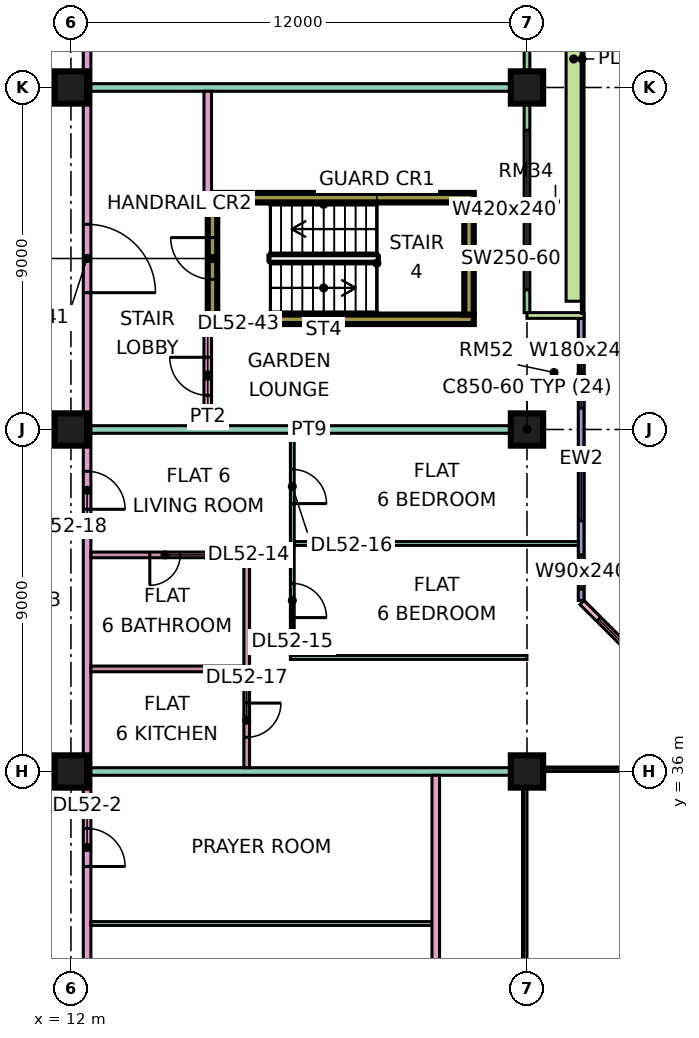
"""IFC4 building model, lengths in metres.
Left out: names, types, materials, properties, quantities, classifications, styles, units other than length and angle.
Written with IfcOpenShell. Run it as: python <this file> out.ifc"""

import sys

from ifc_helpers import new_model, si_unit, direction, frame, frame_2d, origin, origin_2d, place, context, subcontext, project, spatial, rectangle, extrude, element, fill, save


model = new_model("IFC4")
c1 = context("Model", 3, precision=1e-05, world=origin(), true_north=direction((0.0, 1.0)))
c2 = subcontext(c1, "Body", "Model", "MODEL_VIEW")
j1 = project(units=[si_unit("LENGTHUNIT", "METRE"), si_unit("PLANEANGLEUNIT", "RADIAN")], contexts=[c1])
p1 = place(None, origin())
s1 = spatial("IfcSite", under=j1, at=p1, CompositionType="ELEMENT")
p2 = place(p1, origin())
s2 = spatial("IfcBuilding", under=s1, at=p2, CompositionType="ELEMENT")
p3 = place(p2, frame((0.0, 0.0, 222.9)))
s3 = spatial("IfcBuildingStorey", under=s2, at=p3, CompositionType="ELEMENT", Elevation=222.9)
for number, where, z_axis, x_axis in (
    (1, (12.0, 36.0, 0.0), (0.0, 0.0, 1.0), (1.0, 0.0, 0.0)),
    (2, (12.0, 45.0, 0.0), (0.0, 0.0, 1.0), (1.0, 0.0, 0.0)),
    (3, (12.0, 54.0, 0.0), (0.0, 0.0, 1.0), (1.0, 0.0, 0.0)),
    (4, (24.0, 36.0, 0.0), (0.0, 0.0, 1.0), (1.0, 0.0, 0.0)),
    (5, (24.0, 45.0, 0.0), (0.0, 0.0, 1.0), (1.0, 0.0, 0.0)),
    (6, (24.0, 54.0, 0.0), (0.0, 0.0, 1.0), (1.0, 0.0, 0.0)),
):
    element("IfcColumn", number, at=place(p3, frame(where, z_axis=z_axis, x_axis=x_axis)), inside=s3, PredefinedType="COLUMN", context=c2, shape_type="SweptSolid", body=[
        extrude(rectangle(XDim=0.85, YDim=0.85, at=origin_2d()), origin(), (0.0, 0.0, 1.0), 3.75),
    ])
for number, where, z_axis, x_axis in (
    (7, (15.6, 47.9, 0.0), (0.0, 0.0, 1.0), (1.0, 0.0, 0.0)),
    (8, (15.6, 51.1, 0.0), (0.0, 0.0, 1.0), (1.0, 0.0, 0.0)),
):
    element("IfcWall", number, at=place(p3, frame(where, z_axis=z_axis, x_axis=x_axis)), inside=s3, PredefinedType="SHEAR", context=c2, shape_type="SweptSolid", body=[
        extrude(rectangle(XDim=7.0, YDim=0.25, at=frame_2d((3.5, 0.0))), origin(), (0.0, 0.0, 1.0), 3.75),
    ])
p4 = place(p3, frame((15.725, 48.025, 0.0), z_axis=(0.0, 0.0, 1.0), x_axis=(0.0, 1.0, 0.0)))
e9 = element("IfcWall", 9, at=p4, inside=s3, PredefinedType="SHEAR", context=c2, shape_type="SweptSolid", body=[
    extrude(rectangle(XDim=2.95, YDim=0.25, at=frame_2d((1.475, 0.0))), origin(), (0.0, 0.0, 1.0), 3.75),
])
p5 = place(p4, frame((0.925, 0.0, 0.0)))
e10 = element("IfcOpeningElement", 10, at=p5, cuts=e9, PredefinedType="OPENING", context=c2, shape_type="SweptSolid", body=[
    extrude(rectangle(XDim=1.1, YDim=2.2, at=frame_2d((0.55, 1.1))), frame((0.0, 0.135, 0.0), z_axis=(0.0, -1.0, 0.0), x_axis=(1.0, 0.0, 0.0)), (0.0, 0.0, 1.0), 0.27),
])
p6 = place(p3, frame((22.475, 48.025, 0.0), z_axis=(0.0, 0.0, 1.0), x_axis=(0.0, 1.0, 0.0)))
e11 = element("IfcWall", 11, at=p6, inside=s3, PredefinedType="SHEAR", context=c2, shape_type="SweptSolid", body=[
    extrude(rectangle(XDim=2.95, YDim=0.25, at=frame_2d((1.475, 0.0))), origin(), (0.0, 0.0, 1.0), 3.75),
])
p7 = place(p3, frame((28.447, 37.447, 0.0), z_axis=(0.0, 0.0, 1.0), x_axis=(-0.707106781187, 0.707106781187, 0.0)))
e12 = element("IfcWall", 12, at=p7, inside=s3, PredefinedType="SOLIDWALL", context=c2, shape_type="SweptSolid", body=[
    extrude(rectangle(XDim=4.243, YDim=0.15, at=frame_2d((2.121, 0.0))), origin(), (0.0, 0.0, 1.0), 3.35),
])
p8 = place(p7, frame((0.621, 0.0, 0.45)))
e13 = element("IfcOpeningElement", 13, at=p8, cuts=e12, PredefinedType="OPENING", context=c2, shape_type="SweptSolid", body=[
    extrude(rectangle(XDim=3.0, YDim=2.4, at=frame_2d((1.5, 1.2))), frame((0.0, 0.085, 0.0), z_axis=(0.0, -1.0, 0.0), x_axis=(1.0, 0.0, 0.0)), (0.0, 0.0, 1.0), 0.17),
])
p9 = place(p3, frame((25.425, 40.5, 0.0), z_axis=(0.0, 0.0, 1.0), x_axis=(0.0, 1.0, 0.0)))
e14 = element("IfcWall", 14, at=p9, inside=s3, PredefinedType="SOLIDWALL", context=c2, shape_type="SweptSolid", body=[
    extrude(rectangle(XDim=7.425, YDim=0.15, at=frame_2d((3.712, 0.0))), origin(), (0.0, 0.0, 1.0), 3.35),
])
p10 = place(p9, frame((0.3, 0.0, 0.45)))
e15 = element("IfcOpeningElement", 15, at=p10, cuts=e14, PredefinedType="OPENING", context=c2, shape_type="SweptSolid", body=[
    extrude(rectangle(XDim=0.9, YDim=2.4, at=frame_2d((0.45, 1.2))), frame((0.0, 0.085, 0.0), z_axis=(0.0, -1.0, 0.0), x_axis=(1.0, 0.0, 0.0)), (0.0, 0.0, 1.0), 0.17),
])
p11 = place(p9, frame((2.1, 0.0, 0.45)))
e16 = element("IfcOpeningElement", 16, at=p11, cuts=e14, PredefinedType="OPENING", context=c2, shape_type="SweptSolid", body=[
    extrude(rectangle(XDim=1.8, YDim=2.4, at=frame_2d((0.9, 1.2))), frame((0.0, 0.085, 0.0), z_axis=(0.0, -1.0, 0.0), x_axis=(1.0, 0.0, 0.0)), (0.0, 0.0, 1.0), 0.17),
])
p12 = place(p9, frame((5.062, 0.0, 0.45)))
e17 = element("IfcOpeningElement", 17, at=p12, cuts=e14, PredefinedType="OPENING", context=c2, shape_type="SweptSolid", body=[
    extrude(rectangle(XDim=1.8, YDim=2.4, at=frame_2d((0.9, 1.2))), frame((0.0, 0.085, 0.0), z_axis=(0.0, -1.0, 0.0), x_axis=(1.0, 0.0, 0.0)), (0.0, 0.0, 1.0), 0.17),
])
p13 = place(p3, frame((24.0, 48.075, 0.0), z_axis=(0.0, 0.0, 1.0), x_axis=(0.0, 1.0, 0.0)))
e18 = element("IfcWall", 18, at=p13, inside=s3, PredefinedType="SOLIDWALL", context=c2, shape_type="SweptSolid", body=[
    extrude(rectangle(XDim=13.35, YDim=0.15, at=frame_2d((6.675, 0.0))), origin(), (0.0, 0.0, 1.0), 3.35),
])
p14 = place(p13, frame((0.6, 0.0, 0.45)))
e19 = element("IfcOpeningElement", 19, at=p14, cuts=e18, PredefinedType="OPENING", context=c2, shape_type="SweptSolid", body=[
    extrude(rectangle(XDim=4.2, YDim=2.4, at=frame_2d((2.1, 1.2))), frame((0.0, 0.085, 0.0), z_axis=(0.0, -1.0, 0.0), x_axis=(1.0, 0.0, 0.0)), (0.0, 0.0, 1.0), 0.17),
])
p15 = place(p13, frame((8.288, 0.0, 0.0)))
e20 = element("IfcOpeningElement", 20, at=p15, cuts=e18, PredefinedType="OPENING", context=c2, shape_type="SweptSolid", body=[
    extrude(rectangle(XDim=1.8, YDim=2.4, at=frame_2d((0.9, 1.2))), frame((0.0, 0.085, 0.0), z_axis=(0.0, -1.0, 0.0), x_axis=(1.0, 0.0, 0.0)), (0.0, 0.0, 1.0), 0.17),
])
p16 = place(p13, frame((12.188, 0.0, 0.45)))
e21 = element("IfcOpeningElement", 21, at=p16, cuts=e18, PredefinedType="OPENING", context=c2, shape_type="SweptSolid", body=[
    extrude(rectangle(XDim=0.9, YDim=2.4, at=frame_2d((0.45, 1.2))), frame((0.0, 0.085, 0.0), z_axis=(0.0, -1.0, 0.0), x_axis=(1.0, 0.0, 0.0)), (0.0, 0.0, 1.0), 0.17),
])
p17 = place(p3, frame((25.5, 48.0, 0.0), z_axis=(0.0, 0.0, 1.0), x_axis=(-1.0, 0.0, 0.0)))
e22 = element("IfcWall", 22, at=p17, inside=s3, PredefinedType="SOLIDWALL", context=c2, shape_type="SweptSolid", body=[
    extrude(rectangle(XDim=1.5, YDim=0.15, at=frame_2d((0.75, 0.0))), origin(), (0.0, 0.0, 1.0), 3.35),
])
p18 = place(p3, frame((25.229, 48.375, 0.0), z_axis=(0.0, 0.0, 1.0), x_axis=(0.0, 1.0, 0.0)))
e23 = element("IfcWall", 23, at=p18, inside=s3, PredefinedType="SOLIDWALL", context=c2, shape_type="SweptSolid", body=[
    extrude(rectangle(XDim=12.75, YDim=0.4, at=frame_2d((6.375, 0.0))), origin(), (0.0, 0.0, 1.0), 0.7),
])
p19 = place(p3, frame((12.425, 20.0, 0.0), z_axis=(0.0, 0.0, 1.0), x_axis=(0.0, 1.0, 0.0)))
e24 = element("IfcWall", 24, at=p19, inside=s3, PredefinedType="PARTITIONING", context=c2, shape_type="SweptSolid", body=[
    extrude(rectangle(XDim=43.0, YDim=0.2, at=frame_2d((21.5, 0.0))), origin(), (0.0, 0.0, 1.0), 3.35),
])
p20 = place(p19, frame((7.15, 0.0, 0.0)))
e25 = element("IfcOpeningElement", 25, at=p20, cuts=e24, PredefinedType="OPENING", context=c2, shape_type="SweptSolid", body=[
    extrude(rectangle(XDim=1.6, YDim=2.1, at=frame_2d((0.8, 1.05))), frame((0.0, 0.11, 0.0), z_axis=(0.0, -1.0, 0.0), x_axis=(1.0, 0.0, 0.0)), (0.0, 0.0, 1.0), 0.22),
])
p21 = place(p19, frame((13.5, 0.0, 0.0)))
e26 = element("IfcOpeningElement", 26, at=p21, cuts=e24, PredefinedType="OPENING", context=c2, shape_type="SweptSolid", body=[
    extrude(rectangle(XDim=1.0, YDim=2.1, at=frame_2d((0.5, 1.05))), frame((0.0, 0.11, 0.0), z_axis=(0.0, -1.0, 0.0), x_axis=(1.0, 0.0, 0.0)), (0.0, 0.0, 1.0), 0.22),
])
p22 = place(p19, frame((22.9, 0.0, 0.0)))
e27 = element("IfcOpeningElement", 27, at=p22, cuts=e24, PredefinedType="OPENING", context=c2, shape_type="SweptSolid", body=[
    extrude(rectangle(XDim=1.0, YDim=2.1, at=frame_2d((0.5, 1.05))), frame((0.0, 0.11, 0.0), z_axis=(0.0, -1.0, 0.0), x_axis=(1.0, 0.0, 0.0)), (0.0, 0.0, 1.0), 0.22),
])
p23 = place(p19, frame((35.35, 0.0, 0.0)))
e28 = element("IfcOpeningElement", 28, at=p23, cuts=e24, PredefinedType="OPENING", context=c2, shape_type="SweptSolid", body=[
    extrude(rectangle(XDim=1.0, YDim=2.1, at=frame_2d((0.5, 1.05))), frame((0.0, 0.11, 0.0), z_axis=(0.0, -1.0, 0.0), x_axis=(1.0, 0.0, 0.0)), (0.0, 0.0, 1.0), 0.22),
])
p24 = place(p19, frame((1.15, 0.0, 0.0)))
e29 = element("IfcOpeningElement", 29, at=p24, cuts=e24, PredefinedType="OPENING", context=c2, shape_type="SweptSolid", body=[
    extrude(rectangle(XDim=1.8, YDim=2.1, at=frame_2d((0.9, 1.05))), frame((0.0, 0.11, 0.0), z_axis=(0.0, -1.0, 0.0), x_axis=(1.0, 0.0, 0.0)), (0.0, 0.0, 1.0), 0.22),
])
p25 = place(p19, frame((28.6, 0.0, 0.0)))
e30 = element("IfcOpeningElement", 30, at=p25, cuts=e24, PredefinedType="OPENING", context=c2, shape_type="SweptSolid", body=[
    extrude(rectangle(XDim=1.8, YDim=2.1, at=frame_2d((0.9, 1.05))), frame((0.0, 0.11, 0.0), z_axis=(0.0, -1.0, 0.0), x_axis=(1.0, 0.0, 0.0)), (0.0, 0.0, 1.0), 0.22),
])
p26 = place(p3, frame((12.525, 32.0, 0.0), z_axis=(0.0, 0.0, 1.0), x_axis=(1.0, 0.0, 0.0)))
e31 = element("IfcWall", 31, at=p26, inside=s3, PredefinedType="PARTITIONING", context=c2, shape_type="SweptSolid", body=[
    extrude(rectangle(XDim=8.975, YDim=0.1, at=frame_2d((4.488, 0.0))), origin(), (0.0, 0.0, 1.0), 3.35),
])
p27 = place(p3, frame((12.525, 36.0, 0.0), z_axis=(0.0, 0.0, 1.0), x_axis=(1.0, 0.0, 0.0)))
e32 = element("IfcWall", 32, at=p27, inside=s3, PredefinedType="PARTITIONING", context=c2, shape_type="SweptSolid", body=[
    extrude(rectangle(XDim=11.475, YDim=0.2, at=frame_2d((5.738, 0.0))), origin(), (0.0, 0.0, 1.0), 3.35),
])
p28 = place(p3, frame((12.525, 38.7, 0.0), z_axis=(0.0, 0.0, 1.0), x_axis=(1.0, 0.0, 0.0)))
e33 = element("IfcWall", 33, at=p28, inside=s3, PredefinedType="PARTITIONING", context=c2, shape_type="SweptSolid", body=[
    extrude(rectangle(XDim=4.025, YDim=0.15, at=frame_2d((2.013, 0.0))), origin(), (0.0, 0.0, 1.0), 3.35),
])
p29 = place(p3, frame((12.525, 41.7, 0.0), z_axis=(0.0, 0.0, 1.0), x_axis=(1.0, 0.0, 0.0)))
e34 = element("IfcWall", 34, at=p29, inside=s3, PredefinedType="PARTITIONING", context=c2, shape_type="SweptSolid", body=[
    extrude(rectangle(XDim=4.025, YDim=0.15, at=frame_2d((2.013, 0.0))), origin(), (0.0, 0.0, 1.0), 3.35),
])
p30 = place(p29, frame((1.55, 0.0, 0.0)))
e35 = element("IfcOpeningElement", 35, at=p30, cuts=e34, PredefinedType="OPENING", context=c2, shape_type="SweptSolid", body=[
    extrude(rectangle(XDim=0.8, YDim=2.1, at=frame_2d((0.4, 1.05))), frame((0.0, 0.085, 0.0), z_axis=(0.0, -1.0, 0.0), x_axis=(1.0, 0.0, 0.0)), (0.0, 0.0, 1.0), 0.17),
])
p31 = place(p3, frame((12.525, 45.0, 0.0), z_axis=(0.0, 0.0, 1.0), x_axis=(1.0, 0.0, 0.0)))
e36 = element("IfcWall", 36, at=p31, inside=s3, PredefinedType="PARTITIONING", context=c2, shape_type="SweptSolid", body=[
    extrude(rectangle(XDim=11.475, YDim=0.2, at=frame_2d((5.738, 0.0))), origin(), (0.0, 0.0, 1.0), 3.35),
])
p32 = place(p3, frame((12.525, 54.0, 0.0), z_axis=(0.0, 0.0, 1.0), x_axis=(1.0, 0.0, 0.0)))
e37 = element("IfcWall", 37, at=p32, inside=s3, PredefinedType="PARTITIONING", context=c2, shape_type="SweptSolid", body=[
    extrude(rectangle(XDim=11.401, YDim=0.2, at=frame_2d((5.701, 0.0))), origin(), (0.0, 0.0, 1.0), 3.35),
])
p33 = place(p3, frame((15.6, 45.1, 0.0), z_axis=(0.0, 0.0, 1.0), x_axis=(0.0, 1.0, 0.0)))
e38 = element("IfcWall", 38, at=p33, inside=s3, PredefinedType="PARTITIONING", context=c2, shape_type="SweptSolid", body=[
    extrude(rectangle(XDim=2.675, YDim=0.2, at=frame_2d((1.337, 0.0))), origin(), (0.0, 0.0, 1.0), 3.35),
])
p34 = place(p33, frame((0.8, 0.0, 0.0)))
e39 = element("IfcOpeningElement", 39, at=p34, cuts=e38, PredefinedType="OPENING", context=c2, shape_type="SweptSolid", body=[
    extrude(rectangle(XDim=1.0, YDim=2.1, at=frame_2d((0.5, 1.05))), frame((0.0, 0.11, 0.0), z_axis=(0.0, -1.0, 0.0), x_axis=(1.0, 0.0, 0.0)), (0.0, 0.0, 1.0), 0.22),
])
p35 = place(p3, frame((15.6, 51.225, 0.0), z_axis=(0.0, 0.0, 1.0), x_axis=(0.0, 1.0, 0.0)))
e40 = element("IfcWall", 40, at=p35, inside=s3, PredefinedType="PARTITIONING", context=c2, shape_type="SweptSolid", body=[
    extrude(rectangle(XDim=2.675, YDim=0.2, at=frame_2d((1.337, 0.0))), origin(), (0.0, 0.0, 1.0), 3.35),
])
p36 = place(p3, frame((16.625, 36.1, 0.0), z_axis=(0.0, 0.0, 1.0), x_axis=(0.0, 1.0, 0.0)))
e41 = element("IfcWall", 41, at=p36, inside=s3, PredefinedType="PARTITIONING", context=c2, shape_type="SweptSolid", body=[
    extrude(rectangle(XDim=5.675, YDim=0.15, at=frame_2d((2.837, 0.0))), origin(), (0.0, 0.0, 1.0), 3.35),
])
p37 = place(p36, frame((0.8, 0.0, 0.0)))
e42 = element("IfcOpeningElement", 42, at=p37, cuts=e41, PredefinedType="OPENING", context=c2, shape_type="SweptSolid", body=[
    extrude(rectangle(XDim=0.9, YDim=2.1, at=frame_2d((0.45, 1.05))), frame((0.0, 0.085, 0.0), z_axis=(0.0, -1.0, 0.0), x_axis=(1.0, 0.0, 0.0)), (0.0, 0.0, 1.0), 0.17),
])
p38 = place(p3, frame((17.775, 39.0, 0.0), z_axis=(0.0, 0.0, 1.0), x_axis=(1.0, 0.0, 0.0)))
e43 = element("IfcWall", 43, at=p38, inside=s3, PredefinedType="PARTITIONING", context=c2, shape_type="SweptSolid", body=[
    extrude(rectangle(XDim=6.225, YDim=0.1, at=frame_2d((3.113, 0.0))), origin(), (0.0, 0.0, 1.0), 3.35),
])
p39 = place(p3, frame((17.825, 39.05, 0.0), z_axis=(0.0, 0.0, 1.0), x_axis=(0.0, 1.0, 0.0)))
e44 = element("IfcWall", 44, at=p39, inside=s3, PredefinedType="PARTITIONING", context=c2, shape_type="SweptSolid", body=[
    extrude(rectangle(XDim=5.85, YDim=0.1, at=frame_2d((2.925, 0.0))), origin(), (0.0, 0.0, 1.0), 3.35),
])
p40 = place(p39, frame((1.0, 0.0, 0.0)))
e45 = element("IfcOpeningElement", 45, at=p40, cuts=e44, PredefinedType="OPENING", context=c2, shape_type="SweptSolid", body=[
    extrude(rectangle(XDim=0.9, YDim=2.1, at=frame_2d((0.45, 1.05))), frame((0.0, 0.06, 0.0), z_axis=(0.0, -1.0, 0.0), x_axis=(1.0, 0.0, 0.0)), (0.0, 0.0, 1.0), 0.12),
])
p41 = place(p39, frame((4.0, 0.0, 0.0)))
e46 = element("IfcOpeningElement", 46, at=p41, cuts=e44, PredefinedType="OPENING", context=c2, shape_type="SweptSolid", body=[
    extrude(rectangle(XDim=0.9, YDim=2.1, at=frame_2d((0.45, 1.05))), frame((0.0, 0.06, 0.0), z_axis=(0.0, -1.0, 0.0), x_axis=(1.0, 0.0, 0.0)), (0.0, 0.0, 1.0), 0.12),
])
p42 = place(p3, frame((17.875, 42.0, 0.0), z_axis=(0.0, 0.0, 1.0), x_axis=(1.0, 0.0, 0.0)))
e47 = element("IfcWall", 47, at=p42, inside=s3, PredefinedType="PARTITIONING", context=c2, shape_type="SweptSolid", body=[
    extrude(rectangle(XDim=7.476, YDim=0.1, at=frame_2d((3.738, 0.0))), origin(), (0.0, 0.0, 1.0), 3.35),
])
p43 = place(p3, frame((21.6, 23.9, 0.0), z_axis=(0.0, 0.0, 1.0), x_axis=(0.0, 1.0, 0.0)))
e48 = element("IfcWall", 48, at=p43, inside=s3, PredefinedType="PARTITIONING", context=c2, shape_type="SweptSolid", body=[
    extrude(rectangle(XDim=12.0, YDim=0.2, at=frame_2d((6.0, 0.0))), origin(), (0.0, 0.0, 1.0), 3.35),
])
p44 = place(p8, origin())
e49 = element("IfcWindow", 49, at=p44, inside=s3, PartitioningType="SINGLE_PANEL", PredefinedType="WINDOW", context=c2, shape_type="SweptSolid", body=[
    extrude(rectangle(XDim=3.0, YDim=2.4, at=frame_2d((1.5, 1.2))), frame((0.0, 0.03, 0.0), z_axis=(0.0, -1.0, 0.0), x_axis=(1.0, 0.0, 0.0)), (0.0, 0.0, 1.0), 0.06),
])
fill(e13, e49)
p45 = place(p10, origin())
e50 = element("IfcWindow", 50, at=p45, inside=s3, PartitioningType="SINGLE_PANEL", PredefinedType="WINDOW", context=c2, shape_type="SweptSolid", body=[
    extrude(rectangle(XDim=0.9, YDim=2.4, at=frame_2d((0.45, 1.2))), frame((0.0, 0.03, 0.0), z_axis=(0.0, -1.0, 0.0), x_axis=(1.0, 0.0, 0.0)), (0.0, 0.0, 1.0), 0.06),
])
fill(e15, e50)
p46 = place(p11, origin())
e51 = element("IfcWindow", 51, at=p46, inside=s3, PartitioningType="SINGLE_PANEL", PredefinedType="WINDOW", context=c2, shape_type="SweptSolid", body=[
    extrude(rectangle(XDim=1.8, YDim=2.4, at=frame_2d((0.9, 1.2))), frame((0.0, 0.03, 0.0), z_axis=(0.0, -1.0, 0.0), x_axis=(1.0, 0.0, 0.0)), (0.0, 0.0, 1.0), 0.06),
])
fill(e16, e51)
p47 = place(p12, origin())
e52 = element("IfcWindow", 52, at=p47, inside=s3, PartitioningType="SINGLE_PANEL", PredefinedType="WINDOW", context=c2, shape_type="SweptSolid", body=[
    extrude(rectangle(XDim=1.8, YDim=2.4, at=frame_2d((0.9, 1.2))), frame((0.0, 0.03, 0.0), z_axis=(0.0, -1.0, 0.0), x_axis=(1.0, 0.0, 0.0)), (0.0, 0.0, 1.0), 0.06),
])
fill(e17, e52)
p48 = place(p14, origin())
e53 = element("IfcWindow", 53, at=p48, inside=s3, PartitioningType="SINGLE_PANEL", PredefinedType="WINDOW", context=c2, shape_type="SweptSolid", body=[
    extrude(rectangle(XDim=4.2, YDim=2.4, at=frame_2d((2.1, 1.2))), frame((0.0, 0.03, 0.0), z_axis=(0.0, -1.0, 0.0), x_axis=(1.0, 0.0, 0.0)), (0.0, 0.0, 1.0), 0.06),
])
fill(e19, e53)
p49 = place(p5, frame((1.1, 0.0, 0.0), z_axis=(0.0, 0.0, 1.0), x_axis=(-1.0, 0.0, 0.0)))
e54 = element("IfcDoor", 54, at=p49, inside=s3, OperationType="SINGLE_SWING_RIGHT", PredefinedType="DOOR", context=c2, shape_type="SweptSolid", body=[
    extrude(rectangle(XDim=1.1, YDim=2.2, at=frame_2d((0.55, 1.1))), frame((0.0, 0.025, 0.0), z_axis=(0.0, -1.0, 0.0), x_axis=(1.0, 0.0, 0.0)), (0.0, 0.0, 1.0), 0.05),
])
fill(e10, e54)
p50 = place(p21, frame((1.0, 0.0, 0.0), z_axis=(0.0, 0.0, 1.0), x_axis=(-1.0, 0.0, 0.0)))
e55 = element("IfcDoor", 55, at=p50, inside=s3, OperationType="SINGLE_SWING_LEFT", PredefinedType="DOOR", context=c2, shape_type="SweptSolid", body=[
    extrude(rectangle(XDim=1.0, YDim=2.1, at=frame_2d((0.5, 1.05))), frame((0.0, 0.025, 0.0), z_axis=(0.0, -1.0, 0.0), x_axis=(1.0, 0.0, 0.0)), (0.0, 0.0, 1.0), 0.05),
])
fill(e26, e55)
p51 = place(p30, frame((0.8, 0.0, 0.0), z_axis=(0.0, 0.0, 1.0), x_axis=(-1.0, 0.0, 0.0)))
e56 = element("IfcDoor", 56, at=p51, inside=s3, OperationType="SINGLE_SWING_LEFT", PredefinedType="DOOR", context=c2, shape_type="SweptSolid", body=[
    extrude(rectangle(XDim=0.8, YDim=2.1, at=frame_2d((0.4, 1.05))), frame((0.0, 0.025, 0.0), z_axis=(0.0, -1.0, 0.0), x_axis=(1.0, 0.0, 0.0)), (0.0, 0.0, 1.0), 0.05),
])
fill(e35, e56)
p52 = place(p40, frame((0.9, 0.0, 0.0), z_axis=(0.0, 0.0, 1.0), x_axis=(-1.0, 0.0, 0.0)))
e57 = element("IfcDoor", 57, at=p52, inside=s3, OperationType="SINGLE_SWING_LEFT", PredefinedType="DOOR", context=c2, shape_type="SweptSolid", body=[
    extrude(rectangle(XDim=0.9, YDim=2.1, at=frame_2d((0.45, 1.05))), frame((0.0, 0.025, 0.0), z_axis=(0.0, -1.0, 0.0), x_axis=(1.0, 0.0, 0.0)), (0.0, 0.0, 1.0), 0.05),
])
fill(e45, e57)
p53 = place(p41, frame((0.9, 0.0, 0.0), z_axis=(0.0, 0.0, 1.0), x_axis=(-1.0, 0.0, 0.0)))
e58 = element("IfcDoor", 58, at=p53, inside=s3, OperationType="SINGLE_SWING_LEFT", PredefinedType="DOOR", context=c2, shape_type="SweptSolid", body=[
    extrude(rectangle(XDim=0.9, YDim=2.1, at=frame_2d((0.45, 1.05))), frame((0.0, 0.025, 0.0), z_axis=(0.0, -1.0, 0.0), x_axis=(1.0, 0.0, 0.0)), (0.0, 0.0, 1.0), 0.05),
])
fill(e46, e58)
p54 = place(p37, origin())
e59 = element("IfcDoor", 59, at=p54, inside=s3, OperationType="SINGLE_SWING_RIGHT", PredefinedType="DOOR", context=c2, shape_type="SweptSolid", body=[
    extrude(rectangle(XDim=0.9, YDim=2.1, at=frame_2d((0.45, 1.05))), frame((0.0, 0.025, 0.0), z_axis=(0.0, -1.0, 0.0), x_axis=(1.0, 0.0, 0.0)), (0.0, 0.0, 1.0), 0.05),
])
fill(e42, e59)
p55 = place(p22, frame((1.0, 0.0, 0.0), z_axis=(0.0, 0.0, 1.0), x_axis=(-1.0, 0.0, 0.0)))
e60 = element("IfcDoor", 60, at=p55, inside=s3, OperationType="SINGLE_SWING_LEFT", PredefinedType="DOOR", context=c2, shape_type="SweptSolid", body=[
    extrude(rectangle(XDim=1.0, YDim=2.1, at=frame_2d((0.5, 1.05))), frame((0.0, 0.025, 0.0), z_axis=(0.0, -1.0, 0.0), x_axis=(1.0, 0.0, 0.0)), (0.0, 0.0, 1.0), 0.05),
])
fill(e27, e60)
p56 = place(p25, frame((1.8, 0.0, 0.0), z_axis=(0.0, 0.0, 1.0), x_axis=(-1.0, 0.0, 0.0)))
e61 = element("IfcDoor", 61, at=p56, inside=s3, OperationType="DOUBLE_DOOR_SINGLE_SWING", PredefinedType="DOOR", context=c2, shape_type="SweptSolid", body=[
    extrude(rectangle(XDim=1.8, YDim=2.1, at=frame_2d((0.9, 1.05))), frame((0.0, 0.025, 0.0), z_axis=(0.0, -1.0, 0.0), x_axis=(1.0, 0.0, 0.0)), (0.0, 0.0, 1.0), 0.05),
])
fill(e30, e61)
p57 = place(p34, frame((1.0, 0.0, 0.0), z_axis=(0.0, 0.0, 1.0), x_axis=(-1.0, 0.0, 0.0)))
e62 = element("IfcDoor", 62, at=p57, inside=s3, OperationType="SINGLE_SWING_RIGHT", PredefinedType="DOOR", context=c2, shape_type="SweptSolid", body=[
    extrude(rectangle(XDim=1.0, YDim=2.1, at=frame_2d((0.5, 1.05))), frame((0.0, 0.025, 0.0), z_axis=(0.0, -1.0, 0.0), x_axis=(1.0, 0.0, 0.0)), (0.0, 0.0, 1.0), 0.05),
])
fill(e39, e62)
save(model, sys.argv[1])
